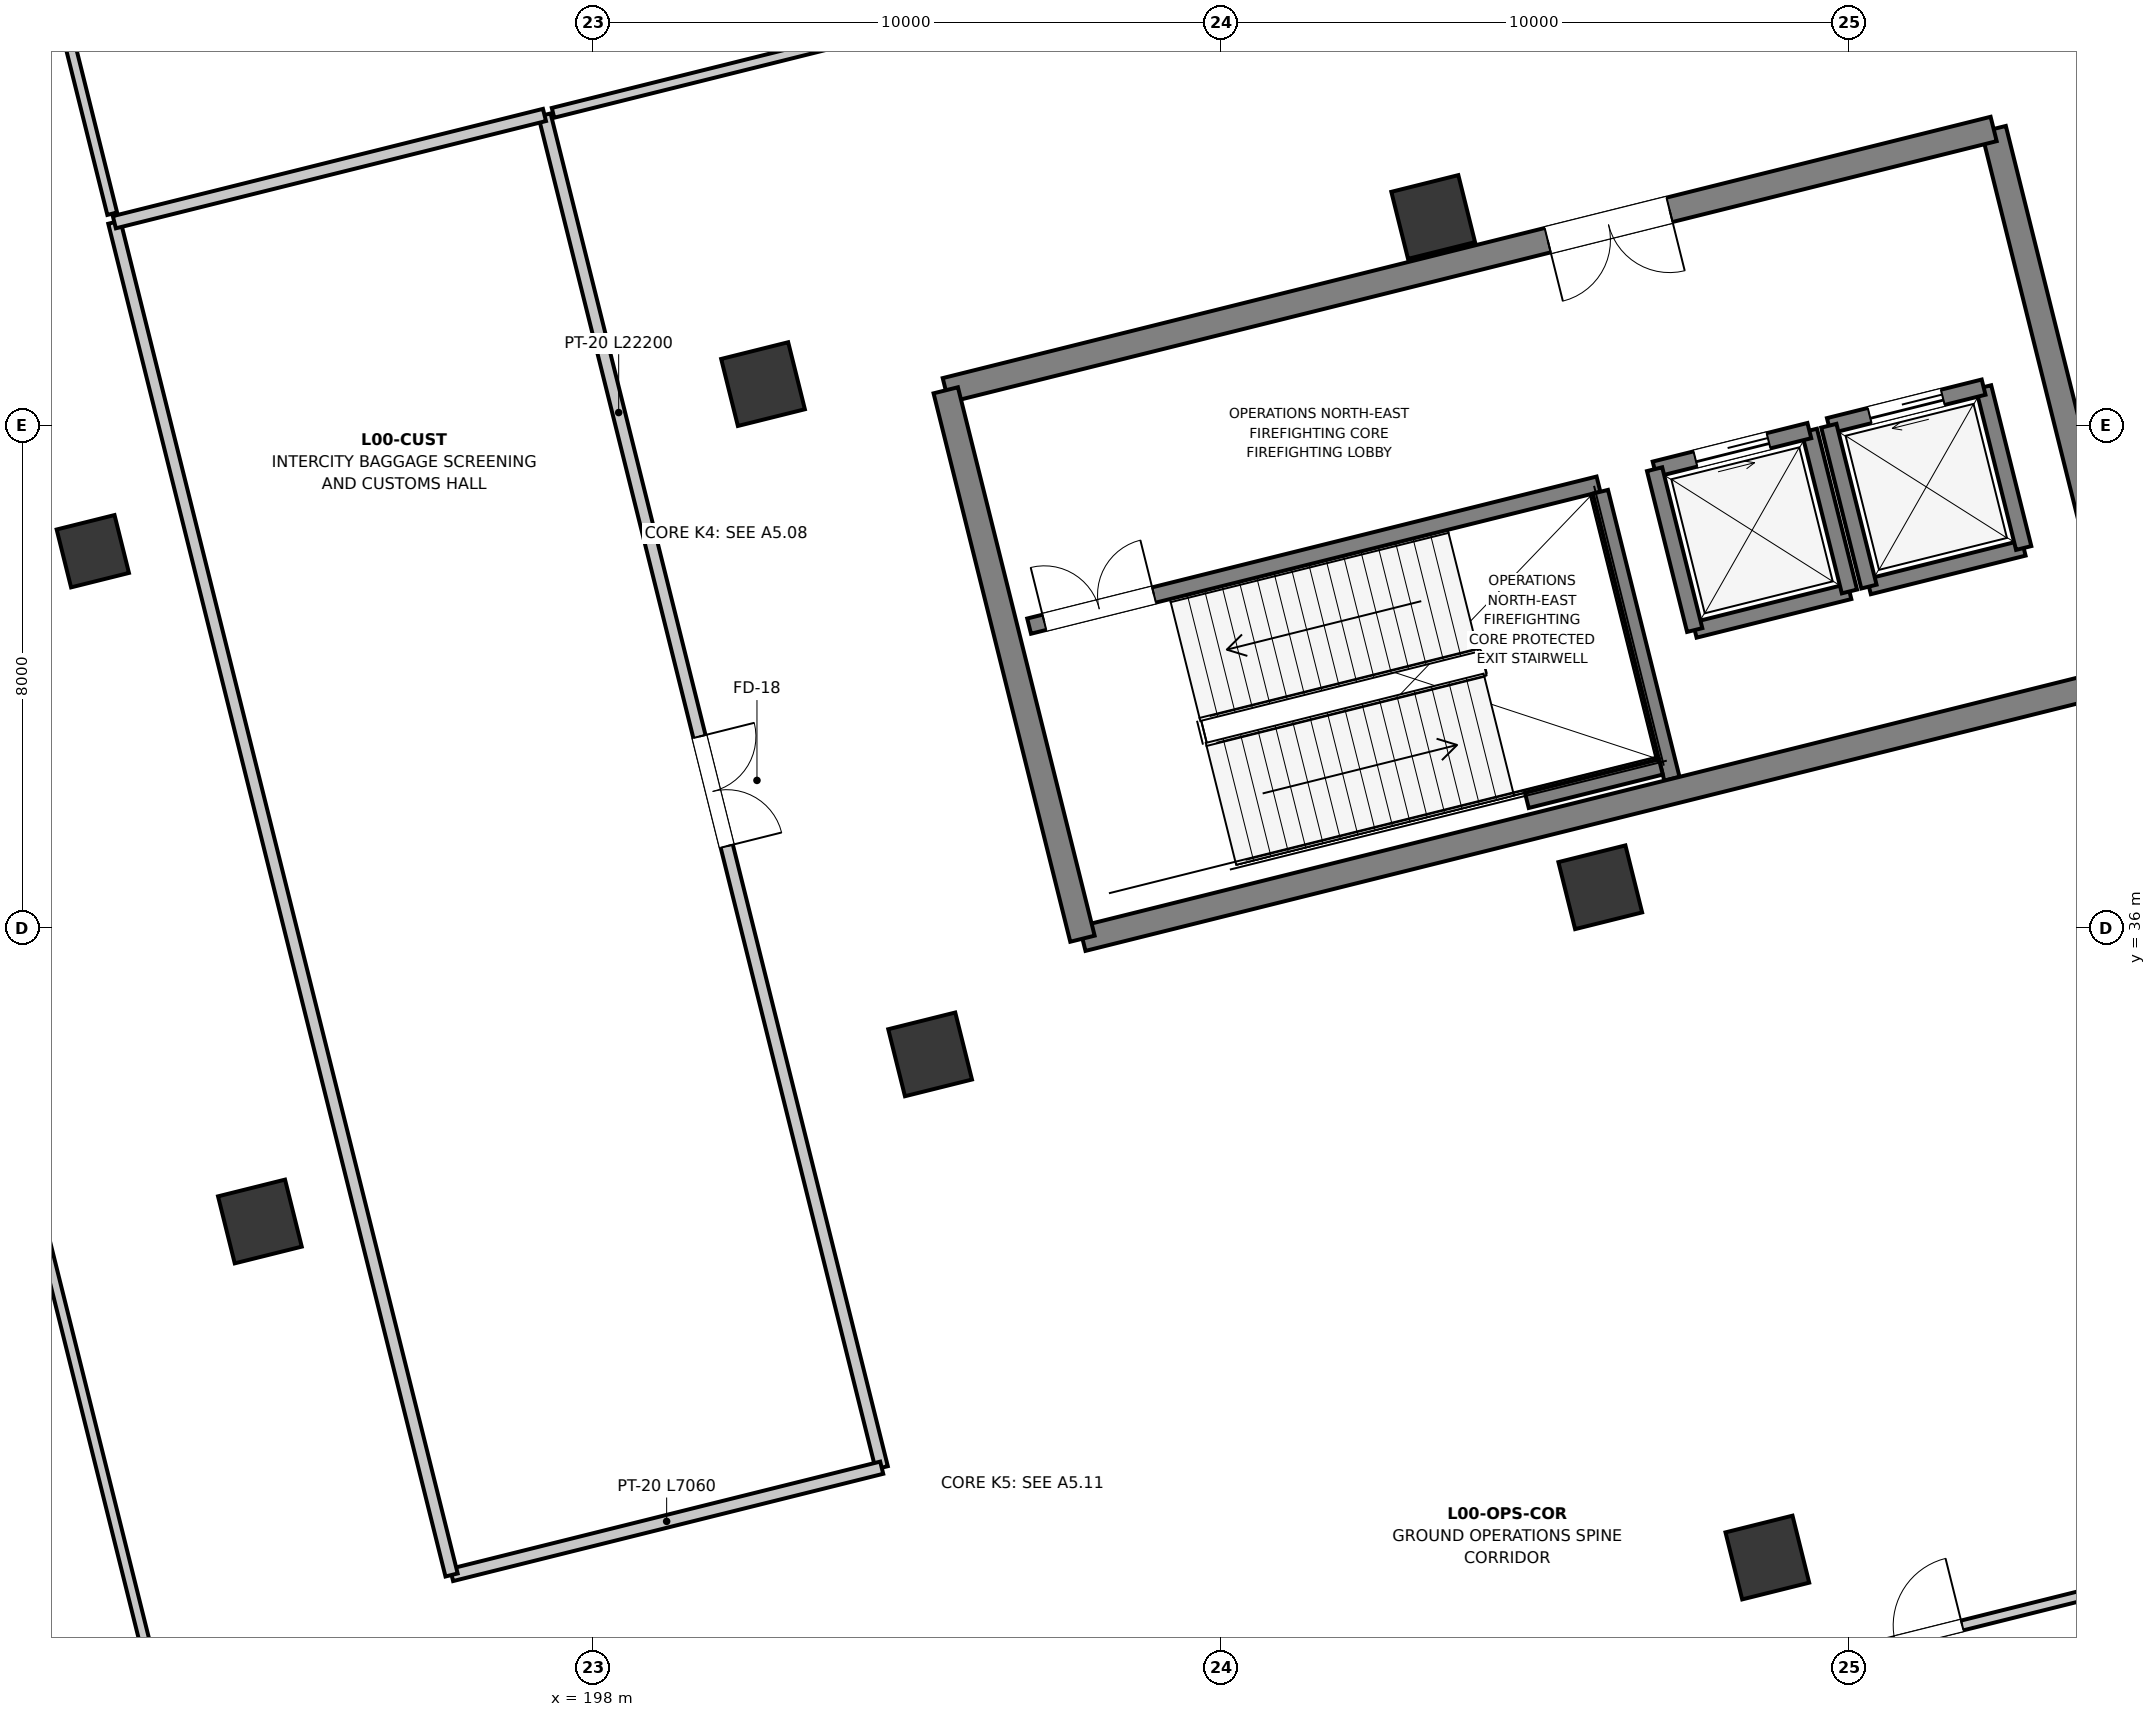
"""IFC4 building model, lengths in metres.
Left out: names, types, materials, properties, quantities, classifications, styles, units other than length and angle.
Written with IfcOpenShell. Run it as: python <this file> out.ifc"""

import sys

from ifc_helpers import new_model, si_unit, direction, frame, frame_2d, origin, origin_2d, place, context, subcontext, project, spatial, rectangle, extrude, element, fill, save


model = new_model("IFC4")
c1 = context("Model", 3, precision=1e-05, world=origin(), true_north=direction((0.0, 1.0)))
c2 = subcontext(c1, "Body", "Model", "MODEL_VIEW")
j1 = project(units=[si_unit("LENGTHUNIT", "METRE"), si_unit("PLANEANGLEUNIT", "RADIAN")], contexts=[c1])
p1 = place(None, origin())
s1 = spatial("IfcSite", under=j1, at=p1, CompositionType="ELEMENT")
p2 = place(p1, origin())
s2 = spatial("IfcBuilding", under=s1, at=p2, CompositionType="ELEMENT")
p3 = place(p2, origin())
s3 = spatial("IfcBuildingStorey", under=s2, at=p3, CompositionType="ELEMENT", Elevation=0.0)
p4 = place(p3, frame((192.697, 31.33, 0.0), z_axis=(0.0, 0.0, 1.0), x_axis=(0.970295726276, 0.2419218956, 0.0)))
e1 = element("IfcColumn", 1, at=p4, inside=s3, PredefinedType="COLUMN", context=c2, shape_type="SweptSolid", body=[
    extrude(rectangle(XDim=1.1, YDim=1.1, at=origin_2d()), origin(), (0.0, 0.0, 1.0), 6.0),
])
p5 = place(p3, frame((190.036, 42.003, 0.0), z_axis=(0.0, 0.0, 1.0), x_axis=(0.970295726276, 0.2419218956, 0.0)))
e2 = element("IfcColumn", 2, at=p5, inside=s3, PredefinedType="COLUMN", context=c2, shape_type="SweptSolid", body=[
    extrude(rectangle(XDim=0.95, YDim=0.95, at=origin_2d()), origin(), (0.0, 0.0, 1.0), 6.0),
])
for number, where, z_axis, x_axis in (
    (3, (203.371, 33.991, 0.0), (0.0, 0.0, 1.0), (0.97, 0.242, 0.0)),
    (4, (200.71, 44.664, 0.0), (0.0, 0.0, 1.0), (0.97, 0.242, 0.0)),
    (5, (216.705, 25.979, 0.0), (0.0, 0.0, 1.0), (0.97, 0.242, 0.0)),
    (6, (214.044, 36.652, 0.0), (0.0, 0.0, 1.0), (0.97, 0.242, 0.0)),
    (7, (211.383, 47.325, 0.0), (0.0, 0.0, 1.0), (0.97, 0.242, 0.0)),
):
    element("IfcColumn", number, at=place(p3, frame(where, z_axis=z_axis, x_axis=x_axis)), inside=s3, PredefinedType="COLUMN", context=c2, shape_type="SweptSolid", body=[
        extrude(rectangle(XDim=1.1, YDim=1.1, at=origin_2d()), origin(), (0.0, 0.0, 1.0), 6.0),
    ])
p6 = place(p3, frame((222.056, 49.987, 0.0), z_axis=(0.0, 0.0, 1.0), x_axis=(0.970295726276, 0.2419218956, 0.0)))
e8 = element("IfcColumn", 8, at=p6, inside=s3, PredefinedType="COLUMN", context=c2, shape_type="SweptSolid", body=[
    extrude(rectangle(XDim=0.7, YDim=1.4, at=origin_2d()), origin(), (0.0, 0.0, 1.0), 6.0),
])
p7 = place(p3, frame((215.548, 40.748, 0.0), z_axis=(0.0, 0.0, 1.0), x_axis=(0.97029284861, 0.241933436994, 0.0)))
e9 = element("IfcWall", 9, at=p7, inside=s3, PredefinedType="SOLIDWALL", context=c2, shape_type="SweptSolid", body=[
    extrude(rectangle(XDim=2.54, YDim=0.25, at=frame_2d((1.27, 0.0))), origin(), (0.0, 0.0, 1.0), 5.64),
])
p8 = place(p3, frame((218.012, 41.362, 0.0), z_axis=(0.0, 0.0, 1.0), x_axis=(-0.241938414856, 0.970291607413, 0.0)))
e10 = element("IfcWall", 10, at=p8, inside=s3, PredefinedType="SOLIDWALL", context=c2, shape_type="SweptSolid", body=[
    extrude(rectangle(XDim=2.64, YDim=0.25, at=frame_2d((1.32, 0.0))), origin(), (0.0, 0.0, 1.0), 5.64),
])
p9 = place(p3, frame((217.374, 43.924, 0.0), z_axis=(0.0, 0.0, 1.0), x_axis=(-0.97029284861, -0.241933436994, 0.0)))
e11 = element("IfcWall", 11, at=p9, inside=s3, PredefinedType="SOLIDWALL", context=c2, shape_type="SweptSolid", body=[
    extrude(rectangle(XDim=2.54, YDim=0.25, at=frame_2d((1.27, 0.0))), origin(), (0.0, 0.0, 1.0), 5.64),
])
p10 = place(p9, frame((0.67, 0.0, 0.0)))
e12 = element("IfcOpeningElement", 12, at=p10, cuts=e11, PredefinedType="OPENING", context=c2, shape_type="SweptSolid", body=[
    extrude(rectangle(XDim=1.2, YDim=2.2, at=frame_2d((0.6, 1.1))), frame((0.0, 0.135, 0.0), z_axis=(0.0, -1.0, 0.0), x_axis=(1.0, 0.0, 0.0)), (0.0, 0.0, 1.0), 0.27),
])
p11 = place(p3, frame((214.909, 43.309, 0.0), z_axis=(0.0, 0.0, 1.0), x_axis=(0.241938414856, -0.970291607413, 0.0)))
e13 = element("IfcWall", 13, at=p11, inside=s3, PredefinedType="SOLIDWALL", context=c2, shape_type="SweptSolid", body=[
    extrude(rectangle(XDim=2.64, YDim=0.25, at=frame_2d((1.32, 0.0))), origin(), (0.0, 0.0, 1.0), 5.64),
])
p12 = place(p3, frame((218.323, 41.44, 0.0), z_axis=(0.0, 0.0, 1.0), x_axis=(0.97029284861, 0.241933436994, 0.0)))
e14 = element("IfcWall", 14, at=p12, inside=s3, PredefinedType="SOLIDWALL", context=c2, shape_type="SweptSolid", body=[
    extrude(rectangle(XDim=2.54, YDim=0.25, at=frame_2d((1.27, 0.0))), origin(), (0.0, 0.0, 1.0), 5.64),
])
p13 = place(p3, frame((220.787, 42.054, 0.0), z_axis=(0.0, 0.0, 1.0), x_axis=(-0.241938414856, 0.970291607413, 0.0)))
e15 = element("IfcWall", 15, at=p13, inside=s3, PredefinedType="SOLIDWALL", context=c2, shape_type="SweptSolid", body=[
    extrude(rectangle(XDim=2.64, YDim=0.25, at=frame_2d((1.32, 0.0))), origin(), (0.0, 0.0, 1.0), 5.64),
])
p14 = place(p3, frame((220.149, 44.616, 0.0), z_axis=(0.0, 0.0, 1.0), x_axis=(-0.97029284861, -0.241933436994, 0.0)))
e16 = element("IfcWall", 16, at=p14, inside=s3, PredefinedType="SOLIDWALL", context=c2, shape_type="SweptSolid", body=[
    extrude(rectangle(XDim=2.54, YDim=0.25, at=frame_2d((1.27, 0.0))), origin(), (0.0, 0.0, 1.0), 5.64),
])
p15 = place(p14, frame((0.67, 0.0, 0.0)))
e17 = element("IfcOpeningElement", 17, at=p15, cuts=e16, PredefinedType="OPENING", context=c2, shape_type="SweptSolid", body=[
    extrude(rectangle(XDim=1.2, YDim=2.2, at=frame_2d((0.6, 1.1))), frame((0.0, 0.135, 0.0), z_axis=(0.0, -1.0, 0.0), x_axis=(1.0, 0.0, 0.0)), (0.0, 0.0, 1.0), 0.27),
])
p16 = place(p3, frame((217.684, 44.001, 0.0), z_axis=(0.0, 0.0, 1.0), x_axis=(0.241938414856, -0.970291607413, 0.0)))
e18 = element("IfcWall", 18, at=p16, inside=s3, PredefinedType="SOLIDWALL", context=c2, shape_type="SweptSolid", body=[
    extrude(rectangle(XDim=2.64, YDim=0.25, at=frame_2d((1.32, 0.0))), origin(), (0.0, 0.0, 1.0), 5.64),
])
p17 = place(p3, frame((204.948, 40.81, 0.0), z_axis=(0.0, 0.0, 1.0), x_axis=(0.970297151331, 0.241916179943, 0.0)))
e19 = element("IfcWall", 19, at=p17, inside=s3, PredefinedType="SOLIDWALL", context=c2, shape_type="SweptSolid", body=[
    extrude(rectangle(XDim=9.345, YDim=0.25, at=frame_2d((4.673, 0.0))), origin(), (0.0, 0.0, 1.0), 5.62),
])
p18 = place(p17, frame((0.25, 0.0, 0.0)))
e20 = element("IfcOpeningElement", 20, at=p18, cuts=e19, PredefinedType="OPENING", context=c2, shape_type="SweptSolid", body=[
    extrude(rectangle(XDim=1.8, YDim=2.25, at=frame_2d((0.9, 1.125))), frame((0.0, 0.135, 0.0), z_axis=(0.0, -1.0, 0.0), x_axis=(1.0, 0.0, 0.0)), (0.0, 0.0, 1.0), 0.27),
])
p19 = place(p3, frame((215.185, 38.38, 0.0), z_axis=(0.0, 0.0, 1.0), x_axis=(-0.241911120435, 0.970298412763, 0.0)))
e21 = element("IfcWall", 21, at=p19, inside=s3, PredefinedType="SOLIDWALL", context=c2, shape_type="SweptSolid", body=[
    extrude(rectangle(XDim=4.71, YDim=0.25, at=frame_2d((2.355, 0.0))), origin(), (0.0, 0.0, 1.0), 5.62),
])
p20 = place(p3, frame((212.875, 38.035, 0.0), z_axis=(0.0, 0.0, 1.0), x_axis=(0.97029738597, 0.241915238833, 0.0)))
e22 = element("IfcWall", 22, at=p20, inside=s3, PredefinedType="SOLIDWALL", context=c2, shape_type="SweptSolid", body=[
    extrude(rectangle(XDim=2.2, YDim=0.25, at=frame_2d((1.1, 0.0))), origin(), (0.0, 0.0, 1.0), 5.62),
])
p21 = place(p3, frame((205.797, 35.833, 0.0), z_axis=(0.0, 0.0, 1.0), x_axis=(0.970295179998, 0.241924086589, 0.0)))
e23 = element("IfcWall", 23, at=p21, inside=s3, PredefinedType="SHEAR", context=c2, shape_type="SweptSolid", body=[
    extrude(rectangle(XDim=17.2, YDim=0.4, at=frame_2d((8.6, 0.0))), origin(), (0.0, 0.0, 1.0), 5.64),
])
p22 = place(p3, frame((222.486, 39.994, 0.0), z_axis=(0.0, 0.0, 1.0), x_axis=(-0.241923808098, 0.970295249435, 0.0)))
e24 = element("IfcWall", 24, at=p22, inside=s3, PredefinedType="SHEAR", context=c2, shape_type="SweptSolid", body=[
    extrude(rectangle(XDim=9.0, YDim=0.4, at=frame_2d((4.5, 0.0))), origin(), (0.0, 0.0, 1.0), 5.64),
])
p23 = place(p3, frame((220.309, 48.727, 0.0), z_axis=(0.0, 0.0, 1.0), x_axis=(-0.970296544738, -0.241918612906, 0.0)))
e25 = element("IfcWall", 25, at=p23, inside=s3, PredefinedType="SHEAR", context=c2, shape_type="SweptSolid", body=[
    extrude(rectangle(XDim=17.2, YDim=0.4, at=frame_2d((8.6, 0.0))), origin(), (0.0, 0.0, 1.0), 5.64),
])
p24 = place(p23, frame((5.32, 0.0, 0.0)))
e26 = element("IfcOpeningElement", 26, at=p24, cuts=e25, PredefinedType="OPENING", context=c2, shape_type="SweptSolid", body=[
    extrude(rectangle(XDim=2.0, YDim=2.3, at=frame_2d((1.0, 1.15))), frame((0.0, 0.21, 0.0), z_axis=(0.0, -1.0, 0.0), x_axis=(1.0, 0.0, 0.0)), (0.0, 0.0, 1.0), 0.42),
])
p25 = place(p3, frame((203.62, 44.566, 0.0), z_axis=(0.0, 0.0, 1.0), x_axis=(0.241921199913, -0.97029589973, 0.0)))
e27 = element("IfcWall", 27, at=p25, inside=s3, PredefinedType="SHEAR", context=c2, shape_type="SweptSolid", body=[
    extrude(rectangle(XDim=9.0, YDim=0.4, at=frame_2d((4.5, 0.0))), origin(), (0.0, 0.0, 1.0), 5.64),
])
p26 = place(p3, frame((211.319, 22.781, 0.0), z_axis=(0.0, 0.0, 1.0), x_axis=(0.970296178232, 0.241920082897, 0.0)))
e28 = element("IfcWall", 28, at=p26, inside=s3, PredefinedType="PARTITIONING", context=c2, shape_type="SweptSolid", body=[
    extrude(rectangle(XDim=16.4, YDim=0.16, at=frame_2d((8.2, 0.0))), origin(), (0.0, 0.0, 1.0), 5.025),
])
p27 = place(p26, frame((7.65, 0.0, 0.0)))
e29 = element("IfcOpeningElement", 29, at=p27, cuts=e28, PredefinedType="OPENING", context=c2, shape_type="SweptSolid", body=[
    extrude(rectangle(XDim=1.1, YDim=2.2, at=frame_2d((0.55, 1.1))), frame((0.0, 0.09, 0.0), z_axis=(0.0, -1.0, 0.0), x_axis=(1.0, 0.0, 0.0)), (0.0, 0.0, 1.0), 0.18),
])
p28 = place(p3, frame((185.528, 46.032, 0.0), z_axis=(0.0, 0.0, 1.0), x_axis=(0.241924022604, -0.970295195952, 0.0)))
e30 = element("IfcWall", 30, at=p28, inside=s3, PredefinedType="PARTITIONING", context=c2, shape_type="SweptSolid", body=[
    extrude(rectangle(XDim=22.2, YDim=0.16, at=frame_2d((11.1, 0.0))), origin(), (0.0, 0.0, 1.0), 4.975),
])
p29 = place(p3, frame((197.23, 48.95, 0.0), z_axis=(0.0, 0.0, 1.0), x_axis=(0.241924022604, -0.970295195952, 0.0)))
e31 = element("IfcWall", 31, at=p29, inside=s3, PredefinedType="PARTITIONING", context=c2, shape_type="SweptSolid", body=[
    extrude(rectangle(XDim=22.2, YDim=0.2, at=frame_2d((11.1, 0.0))), origin(), (0.0, 0.0, 1.0), 4.365),
])
p30 = place(p29, frame((10.2, 0.0, 0.0)))
e32 = element("IfcOpeningElement", 32, at=p30, cuts=e31, PredefinedType="OPENING", context=c2, shape_type="SweptSolid", body=[
    extrude(rectangle(XDim=1.8, YDim=2.25, at=frame_2d((0.9, 1.125))), frame((0.0, 0.11, 0.0), z_axis=(0.0, -1.0, 0.0), x_axis=(1.0, 0.0, 0.0)), (0.0, 0.0, 1.0), 0.22),
])
p31 = place(p3, frame((202.6, 27.409, 0.0), z_axis=(0.0, 0.0, 1.0), x_axis=(-0.970294782603, -0.241925680435, 0.0)))
e33 = element("IfcWall", 33, at=p31, inside=s3, PredefinedType="PARTITIONING", context=c2, shape_type="SweptSolid", body=[
    extrude(rectangle(XDim=7.06, YDim=0.2, at=frame_2d((3.53, 0.0))), origin(), (0.0, 0.0, 1.0), 5.62),
])
p32 = place(p3, frame((195.75, 25.701, 0.0), z_axis=(0.0, 0.0, 1.0), x_axis=(-0.241924022604, 0.970295195952, 0.0)))
e34 = element("IfcWall", 34, at=p32, inside=s3, PredefinedType="PARTITIONING", context=c2, shape_type="SweptSolid", body=[
    extrude(rectangle(XDim=22.2, YDim=0.2, at=frame_2d((11.1, 0.0))), origin(), (0.0, 0.0, 1.0), 4.365),
])
p33 = place(p3, frame((190.379, 47.242, 0.0), z_axis=(0.0, 0.0, 1.0), x_axis=(0.970294782603, 0.241925680435, 0.0)))
e35 = element("IfcWall", 35, at=p33, inside=s3, PredefinedType="PARTITIONING", context=c2, shape_type="SweptSolid", body=[
    extrude(rectangle(XDim=7.06, YDim=0.2, at=frame_2d((3.53, 0.0))), origin(), (0.0, 0.0, 1.0), 5.63),
])
p34 = place(p3, frame((190.345, 47.377, 0.0), z_axis=(0.0, 0.0, 1.0), x_axis=(-0.241921879243, 0.970295730354, 0.0)))
e36 = element("IfcWall", 36, at=p34, inside=s3, PredefinedType="PARTITIONING", context=c2, shape_type="SweptSolid", body=[
    extrude(rectangle(XDim=27.26, YDim=0.16, at=frame_2d((13.63, 0.0))), origin(), (0.0, 0.0, 1.0), 4.375),
])
p35 = place(p34, frame((13.08, 0.0, 0.0)))
e37 = element("IfcOpeningElement", 37, at=p35, cuts=e36, PredefinedType="OPENING", context=c2, shape_type="SweptSolid", body=[
    extrude(rectangle(XDim=1.1, YDim=2.2, at=frame_2d((0.55, 1.1))), frame((0.0, 0.09, 0.0), z_axis=(0.0, -1.0, 0.0), x_axis=(1.0, 0.0, 0.0)), (0.0, 0.0, 1.0), 0.18),
])
p36 = place(p3, frame((207.262, 51.451, 0.0), z_axis=(0.0, 0.0, 1.0), x_axis=(-0.970295708881, -0.241921965367, 0.0)))
e38 = element("IfcWall", 38, at=p36, inside=s3, PredefinedType="PARTITIONING", context=c2, shape_type="SweptSolid", body=[
    extrude(rectangle(XDim=10.2, YDim=0.16, at=frame_2d((5.1, 0.0))), origin(), (0.0, 0.0, 1.0), 4.425),
])
p37 = place(p10, origin())
e39 = element("IfcDoor", 39, at=p37, inside=s3, OperationType="SLIDING_TO_LEFT", PredefinedType="DOOR", context=c2, shape_type="SweptSolid", body=[
    extrude(rectangle(XDim=1.2, YDim=2.2, at=frame_2d((0.6, 1.1))), frame((0.0, 0.025, 0.0), z_axis=(0.0, -1.0, 0.0), x_axis=(1.0, 0.0, 0.0)), (0.0, 0.0, 1.0), 0.05),
])
fill(e12, e39)
p38 = place(p15, origin())
e40 = element("IfcDoor", 40, at=p38, inside=s3, OperationType="SLIDING_TO_RIGHT", PredefinedType="DOOR", context=c2, shape_type="SweptSolid", body=[
    extrude(rectangle(XDim=1.2, YDim=2.2, at=frame_2d((0.6, 1.1))), frame((0.0, 0.025, 0.0), z_axis=(0.0, -1.0, 0.0), x_axis=(1.0, 0.0, 0.0)), (0.0, 0.0, 1.0), 0.05),
])
fill(e17, e40)
p39 = place(p18, origin())
e41 = element("IfcDoor", 41, at=p39, inside=s3, OperationType="DOUBLE_DOOR_SINGLE_SWING", PredefinedType="DOOR", context=c2, shape_type="SweptSolid", body=[
    extrude(rectangle(XDim=1.8, YDim=2.25, at=frame_2d((0.9, 1.125))), frame((0.0, 0.025, 0.0), z_axis=(0.0, -1.0, 0.0), x_axis=(1.0, 0.0, 0.0)), (0.0, 0.0, 1.0), 0.05),
])
fill(e20, e41)
p40 = place(p24, origin())
e42 = element("IfcDoor", 42, at=p40, inside=s3, OperationType="DOUBLE_DOOR_SINGLE_SWING", PredefinedType="DOOR", context=c2, shape_type="SweptSolid", body=[
    extrude(rectangle(XDim=2.0, YDim=2.3, at=frame_2d((1.0, 1.15))), frame((0.0, 0.025, 0.0), z_axis=(0.0, -1.0, 0.0), x_axis=(1.0, 0.0, 0.0)), (0.0, 0.0, 1.0), 0.05),
])
fill(e26, e42)
p41 = place(p27, origin())
e43 = element("IfcDoor", 43, at=p41, inside=s3, OperationType="SINGLE_SWING_RIGHT", PredefinedType="DOOR", context=c2, shape_type="SweptSolid", body=[
    extrude(rectangle(XDim=1.1, YDim=2.2, at=frame_2d((0.55, 1.1))), frame((0.0, 0.025, 0.0), z_axis=(0.0, -1.0, 0.0), x_axis=(1.0, 0.0, 0.0)), (0.0, 0.0, 1.0), 0.05),
])
fill(e29, e43)
p42 = place(p30, origin())
e44 = element("IfcDoor", 44, at=p42, inside=s3, OperationType="DOUBLE_DOOR_SINGLE_SWING", PredefinedType="DOOR", context=c2, shape_type="SweptSolid", body=[
    extrude(rectangle(XDim=1.8, YDim=2.25, at=frame_2d((0.9, 1.125))), frame((0.0, 0.025, 0.0), z_axis=(0.0, -1.0, 0.0), x_axis=(1.0, 0.0, 0.0)), (0.0, 0.0, 1.0), 0.05),
])
fill(e32, e44)
save(model, sys.argv[1])
